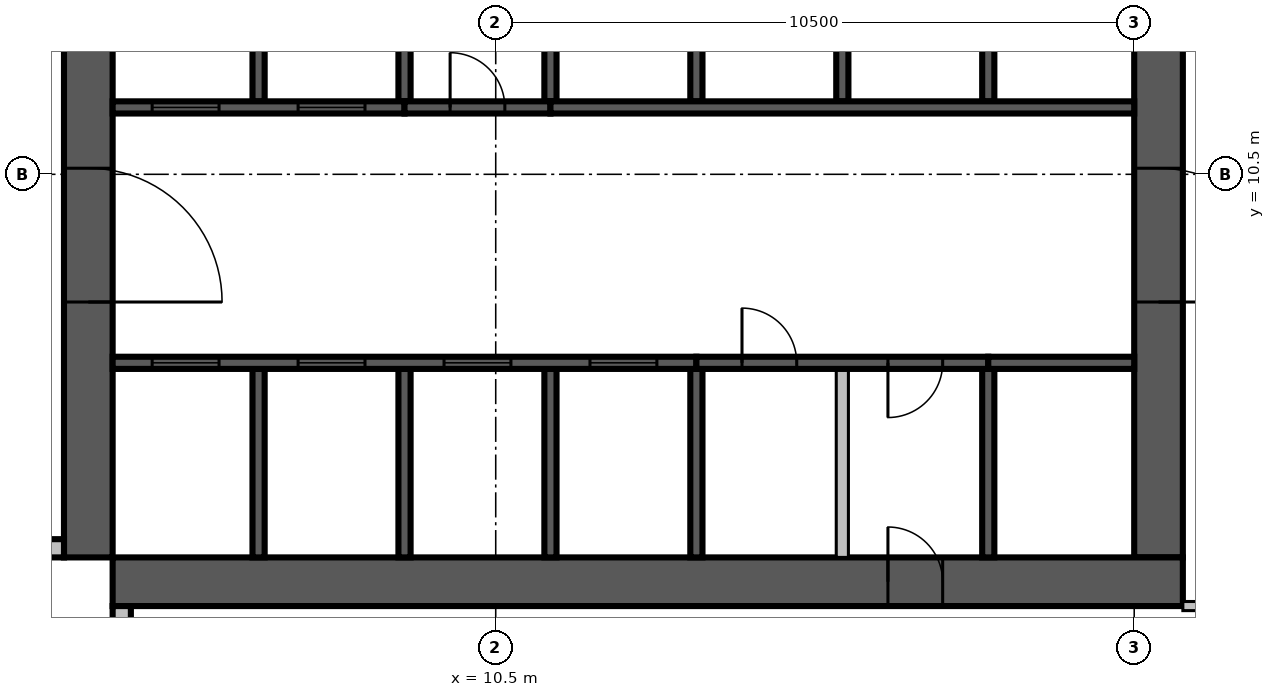
"""IFC4 building model, lengths in metres.
Left out: names, types, materials, properties, quantities, classifications, styles, units other than length and angle.
Written with IfcOpenShell. Run it as: python <this file> out.ifc"""

import sys

from ifc_helpers import new_model, si_unit, direction, frame, frame_2d, origin, place, context, subcontext, project, spatial, rectangle, extrude, source, transform, mapped, element, fill, save


model = new_model("IFC4")
c1 = context("Model", 3, precision=1e-05, world=origin(), true_north=direction((0.0, 1.0)))
c2 = subcontext(c1, "Body", "Model", "MODEL_VIEW")
j1 = project(units=[si_unit("LENGTHUNIT", "METRE"), si_unit("PLANEANGLEUNIT", "RADIAN")], contexts=[c1])
p1 = place(None, origin())
s1 = spatial("IfcSite", under=j1, at=p1, CompositionType="ELEMENT")
p2 = place(p1, origin())
s2 = spatial("IfcBuilding", under=s1, at=p2, CompositionType="ELEMENT")
p3 = place(p2, frame((0.0, 0.0, 196.8)))
s3 = spatial("IfcBuildingStorey", under=s2, at=p3, CompositionType="ELEMENT", Elevation=196.8)
m1 = source(origin(), c2, "Body", "SweptSolid", [
    extrude(rectangle(XDim=17.6, YDim=0.8, at=frame_2d((8.8, 0.0))), origin(), (0.0, 0.0, 1.0), 3.8),
])
p4 = place(p3, frame((3.8, 4.2, 0.0), z_axis=(0.0, 0.0, 1.0), x_axis=(0.0, 1.0, 0.0)))
e1 = element("IfcWall", 1, at=p4, inside=s3, PredefinedType="SHEAR", context=c2, shape_type="MappedRepresentation", body=[
    mapped(m1, transform((0.0, 0.0, 0.0), scale=1.0)),
])
m2 = source(origin(), c2, "Body", "SweptSolid", [
    extrude(rectangle(XDim=2.2, YDim=2.1, at=frame_2d((1.1, 1.05))), frame((0.0, 0.41, 0.0), z_axis=(0.0, -1.0, 0.0), x_axis=(1.0, 0.0, 0.0)), (0.0, 0.0, 1.0), 0.82),
])
p5 = place(p4, frame((4.2, 0.0, 0.0)))
e2 = element("IfcOpeningElement", 2, at=p5, cuts=e1, PredefinedType="OPENING", context=c2, shape_type="MappedRepresentation", body=[
    mapped(m2, transform((0.0, 0.0, 0.0), scale=1.0)),
])
m3 = source(origin(), c2, "Body", "SweptSolid", [
    extrude(rectangle(XDim=0.9, YDim=2.1, at=frame_2d((0.45, 1.05))), frame((0.0, 0.41, 0.0), z_axis=(0.0, -1.0, 0.0), x_axis=(1.0, 0.0, 0.0)), (0.0, 0.0, 1.0), 0.82),
])
p6 = place(p4, frame((10.95, 0.0, 0.0)))
e3 = element("IfcOpeningElement", 3, at=p6, cuts=e1, PredefinedType="OPENING", context=c2, shape_type="MappedRepresentation", body=[
    mapped(m3, transform((0.0, 0.0, 0.0), scale=1.0)),
])
m4 = source(origin(), c2, "Body", "SweptSolid", [
    extrude(rectangle(XDim=16.8, YDim=0.8, at=frame_2d((8.4, 0.0))), origin(), (0.0, 0.0, 1.0), 3.8),
])
p7 = place(p3, frame((21.4, 4.2, 0.0), z_axis=(0.0, 0.0, 1.0), x_axis=(0.0, 1.0, 0.0)))
e4 = element("IfcWall", 4, at=p7, inside=s3, PredefinedType="SHEAR", context=c2, shape_type="MappedRepresentation", body=[
    mapped(m4, transform((0.0, 0.0, 0.0), scale=1.0)),
])
p8 = place(p7, frame((4.2, 0.0, 0.0)))
e5 = element("IfcOpeningElement", 5, at=p8, cuts=e4, PredefinedType="OPENING", context=c2, shape_type="MappedRepresentation", body=[
    mapped(m2, transform((0.0, 0.0, 0.0), scale=1.0)),
])
m5 = source(origin(), c2, "Body", "SweptSolid", [
    extrude(rectangle(XDim=1.2, YDim=2.1, at=frame_2d((0.6, 1.05))), frame((0.0, 0.41, 0.0), z_axis=(0.0, -1.0, 0.0), x_axis=(1.0, 0.0, 0.0)), (0.0, 0.0, 1.0), 0.82),
])
p9 = place(p7, frame((14.7, 0.0, 0.0)))
e6 = element("IfcOpeningElement", 6, at=p9, cuts=e4, PredefinedType="OPENING", context=c2, shape_type="MappedRepresentation", body=[
    mapped(m5, transform((0.0, 0.0, 0.0), scale=1.0)),
])
p10 = place(p3, frame((4.2, 3.8, 0.0), z_axis=(0.0, 0.0, 1.0), x_axis=(1.0, 0.0, 0.0)))
e7 = element("IfcWall", 7, at=p10, inside=s3, PredefinedType="SHEAR", context=c2, shape_type="MappedRepresentation", body=[
    mapped(m1, transform((0.0, 0.0, 0.0), scale=1.0)),
])
p11 = place(p10, frame((12.75, 0.0, 0.0)))
e8 = element("IfcOpeningElement", 8, at=p11, cuts=e7, PredefinedType="OPENING", context=c2, shape_type="MappedRepresentation", body=[
    mapped(m3, transform((0.0, 0.0, 0.0), scale=1.0)),
])
m6 = source(origin(), c2, "Body", "SweptSolid", [
    extrude(rectangle(XDim=3.4, YDim=0.3, at=frame_2d((1.7, 0.0))), origin(), (0.0, 0.0, 1.0), 3.4),
])
p12 = place(p3, frame((0.0, 4.35, 0.0), z_axis=(0.0, 0.0, 1.0), x_axis=(1.0, 0.0, 0.0)))
e9 = element("IfcWall", 9, at=p12, inside=s3, PredefinedType="STANDARD", context=c2, shape_type="MappedRepresentation", body=[
    mapped(m6, transform((0.0, 0.0, 0.0), scale=1.0)),
])
m7 = source(origin(), c2, "Body", "SweptSolid", [
    extrude(rectangle(XDim=1.8, YDim=2.3, at=frame_2d((0.9, 1.15))), frame((0.0, 0.16, 0.0), z_axis=(0.0, -1.0, 0.0), x_axis=(1.0, 0.0, 0.0)), (0.0, 0.0, 1.0), 0.32),
])
p13 = place(p12, frame((1.2, 0.0, 0.6)))
e10 = element("IfcOpeningElement", 10, at=p13, cuts=e9, PredefinedType="OPENING", context=c2, shape_type="MappedRepresentation", body=[
    mapped(m7, transform((0.0, 0.0, 0.0), scale=1.0)),
])
p14 = place(p3, frame((4.35, 3.4, 0.0), z_axis=(0.0, 0.0, 1.0), x_axis=(0.0, -1.0, 0.0)))
e11 = element("IfcWall", 11, at=p14, inside=s3, PredefinedType="STANDARD", context=c2, shape_type="MappedRepresentation", body=[
    mapped(m6, transform((0.0, 0.0, 0.0), scale=1.0)),
])
p15 = place(p14, frame((0.4, 0.0, 0.6)))
e12 = element("IfcOpeningElement", 12, at=p15, cuts=e11, PredefinedType="OPENING", context=c2, shape_type="MappedRepresentation", body=[
    mapped(m7, transform((0.0, 0.0, 0.0), scale=1.0)),
])
m8 = source(origin(), c2, "Body", "SweptSolid", [
    extrude(rectangle(XDim=3.1, YDim=0.2, at=frame_2d((1.55, 0.0))), origin(), (0.0, 0.0, 1.0), 3.8),
])
for number, where, z_axis, x_axis in (
    (13, (6.6, 4.2, 0.0), (0.0, 0.0, 1.0), (0.0, 1.0, 0.0)),
    (14, (9.0, 4.2, 0.0), (0.0, 0.0, 1.0), (0.0, 1.0, 0.0)),
    (15, (11.4, 4.2, 0.0), (0.0, 0.0, 1.0), (0.0, 1.0, 0.0)),
):
    element("IfcWall", number, at=place(p3, frame(where, z_axis=z_axis, x_axis=x_axis)), inside=s3, PredefinedType="SOLIDWALL", context=c2, shape_type="MappedRepresentation", body=[
        mapped(m8, transform((0.0, 0.0, 0.0), scale=1.0)),
    ])
m9 = source(origin(), c2, "Body", "SweptSolid", [
    extrude(rectangle(XDim=3.1, YDim=0.2, at=frame_2d((1.55, 0.0))), origin(), (0.0, 0.0, 1.0), 3.4),
])
for number, where, z_axis, x_axis in (
    (16, (13.8, 4.2, 0.0), (0.0, 0.0, 1.0), (0.0, 1.0, 0.0)),
    (17, (18.6, 4.2, 0.0), (0.0, 0.0, 1.0), (0.0, 1.0, 0.0)),
):
    element("IfcWall", number, at=place(p3, frame(where, z_axis=z_axis, x_axis=x_axis)), inside=s3, PredefinedType="SOLIDWALL", context=c2, shape_type="MappedRepresentation", body=[
        mapped(m9, transform((0.0, 0.0, 0.0), scale=1.0)),
    ])
m10 = source(origin(), c2, "Body", "SweptSolid", [
    extrude(rectangle(XDim=3.1, YDim=0.2, at=frame_2d((1.55, 0.0))), origin(), (0.0, 0.0, 1.0), 3.4),
])
p16 = place(p3, frame((16.2, 4.2, 0.0), z_axis=(0.0, 0.0, 1.0), x_axis=(0.0, 1.0, 0.0)))
e18 = element("IfcWall", 18, at=p16, inside=s3, PredefinedType="PARTITIONING", context=c2, shape_type="MappedRepresentation", body=[
    mapped(m10, transform((0.0, 0.0, 0.0), scale=1.0)),
])
m11 = source(origin(), c2, "Body", "SweptSolid", [
    extrude(rectangle(XDim=3.0, YDim=0.2, at=frame_2d((1.5, 0.0))), origin(), (0.0, 0.0, 1.0), 3.8),
])
p17 = place(p3, frame((6.6, 11.7, 0.0), z_axis=(0.0, 0.0, 1.0), x_axis=(0.0, 1.0, 0.0)))
e19 = element("IfcWall", 19, at=p17, inside=s3, PredefinedType="SOLIDWALL", context=c2, shape_type="MappedRepresentation", body=[
    mapped(m11, transform((0.0, 0.0, 0.0), scale=1.0)),
])
m12 = source(origin(), c2, "Body", "SweptSolid", [
    extrude(rectangle(XDim=3.0, YDim=0.2, at=frame_2d((1.5, 0.0))), origin(), (0.0, 0.0, 1.0), 3.4),
])
for number, where, z_axis, x_axis in (
    (20, (9.0, 11.7, 0.0), (0.0, 0.0, 1.0), (0.0, 1.0, 0.0)),
    (21, (11.4, 11.7, 0.0), (0.0, 0.0, 1.0), (0.0, 1.0, 0.0)),
):
    element("IfcWall", number, at=place(p3, frame(where, z_axis=z_axis, x_axis=x_axis)), inside=s3, PredefinedType="SOLIDWALL", context=c2, shape_type="MappedRepresentation", body=[
        mapped(m12, transform((0.0, 0.0, 0.0), scale=1.0)),
    ])
for number, where, z_axis, x_axis in (
    (22, (13.8, 11.7, 0.0), (0.0, 0.0, 1.0), (0.0, 1.0, 0.0)),
    (23, (16.2, 11.7, 0.0), (0.0, 0.0, 1.0), (0.0, 1.0, 0.0)),
    (24, (18.6, 11.7, 0.0), (0.0, 0.0, 1.0), (0.0, 1.0, 0.0)),
):
    element("IfcWall", number, at=place(p3, frame(where, z_axis=z_axis, x_axis=x_axis)), inside=s3, PredefinedType="SOLIDWALL", context=c2, shape_type="MappedRepresentation", body=[
        mapped(m11, transform((0.0, 0.0, 0.0), scale=1.0)),
    ])
m13 = source(origin(), c2, "Body", "SweptSolid", [
    extrude(rectangle(XDim=9.6, YDim=0.2, at=frame_2d((4.8, 0.0))), origin(), (0.0, 0.0, 1.0), 3.8),
])
p18 = place(p3, frame((4.2, 7.4, 0.0), z_axis=(0.0, 0.0, 1.0), x_axis=(1.0, 0.0, 0.0)))
e25 = element("IfcWall", 25, at=p18, inside=s3, PredefinedType="SOLIDWALL", context=c2, shape_type="MappedRepresentation", body=[
    mapped(m13, transform((0.0, 0.0, 0.0), scale=1.0)),
])
m14 = source(origin(), c2, "Body", "SweptSolid", [
    extrude(rectangle(XDim=1.1, YDim=2.1, at=frame_2d((0.55, 1.05))), frame((0.0, 0.11, 0.0), z_axis=(0.0, -1.0, 0.0), x_axis=(1.0, 0.0, 0.0)), (0.0, 0.0, 1.0), 0.22),
])
p19 = place(p18, frame((0.65, 0.0, 0.0)))
e26 = element("IfcOpeningElement", 26, at=p19, cuts=e25, PredefinedType="OPENING", context=c2, shape_type="MappedRepresentation", body=[
    mapped(m14, transform((0.0, 0.0, 0.0), scale=1.0)),
])
p20 = place(p18, frame((3.05, 0.0, 0.0)))
e27 = element("IfcOpeningElement", 27, at=p20, cuts=e25, PredefinedType="OPENING", context=c2, shape_type="MappedRepresentation", body=[
    mapped(m14, transform((0.0, 0.0, 0.0), scale=1.0)),
])
p21 = place(p18, frame((5.45, 0.0, 0.0)))
e28 = element("IfcOpeningElement", 28, at=p21, cuts=e25, PredefinedType="OPENING", context=c2, shape_type="MappedRepresentation", body=[
    mapped(m14, transform((0.0, 0.0, 0.0), scale=1.0)),
])
p22 = place(p18, frame((7.85, 0.0, 0.0)))
e29 = element("IfcOpeningElement", 29, at=p22, cuts=e25, PredefinedType="OPENING", context=c2, shape_type="MappedRepresentation", body=[
    mapped(m14, transform((0.0, 0.0, 0.0), scale=1.0)),
])
m15 = source(origin(), c2, "Body", "SweptSolid", [
    extrude(rectangle(XDim=4.8, YDim=0.2, at=frame_2d((2.4, 0.0))), origin(), (0.0, 0.0, 1.0), 3.4),
])
p23 = place(p3, frame((13.8, 7.4, 0.0), z_axis=(0.0, 0.0, 1.0), x_axis=(1.0, 0.0, 0.0)))
e30 = element("IfcWall", 30, at=p23, inside=s3, PredefinedType="SOLIDWALL", context=c2, shape_type="MappedRepresentation", body=[
    mapped(m15, transform((0.0, 0.0, 0.0), scale=1.0)),
])
m16 = source(origin(), c2, "Body", "SweptSolid", [
    extrude(rectangle(XDim=0.9, YDim=2.1, at=frame_2d((0.45, 1.05))), frame((0.0, 0.11, 0.0), z_axis=(0.0, -1.0, 0.0), x_axis=(1.0, 0.0, 0.0)), (0.0, 0.0, 1.0), 0.22),
])
p24 = place(p23, frame((0.75, 0.0, 0.0)))
e31 = element("IfcOpeningElement", 31, at=p24, cuts=e30, PredefinedType="OPENING", context=c2, shape_type="MappedRepresentation", body=[
    mapped(m16, transform((0.0, 0.0, 0.0), scale=1.0)),
])
p25 = place(p23, frame((3.15, 0.0, 0.0)))
e32 = element("IfcOpeningElement", 32, at=p25, cuts=e30, PredefinedType="OPENING", context=c2, shape_type="MappedRepresentation", body=[
    mapped(m16, transform((0.0, 0.0, 0.0), scale=1.0)),
])
m17 = source(origin(), c2, "Body", "SweptSolid", [
    extrude(rectangle(XDim=2.4, YDim=0.2, at=frame_2d((1.2, 0.0))), origin(), (0.0, 0.0, 1.0), 3.8),
])
p26 = place(p3, frame((18.6, 7.4, 0.0), z_axis=(0.0, 0.0, 1.0), x_axis=(1.0, 0.0, 0.0)))
e33 = element("IfcWall", 33, at=p26, inside=s3, PredefinedType="SOLIDWALL", context=c2, shape_type="MappedRepresentation", body=[
    mapped(m17, transform((0.0, 0.0, 0.0), scale=1.0)),
])
m18 = source(origin(), c2, "Body", "SweptSolid", [
    extrude(rectangle(XDim=4.8, YDim=0.2, at=frame_2d((2.4, 0.0))), origin(), (0.0, 0.0, 1.0), 3.8),
])
p27 = place(p3, frame((4.2, 11.6, 0.0), z_axis=(0.0, 0.0, 1.0), x_axis=(1.0, 0.0, 0.0)))
e34 = element("IfcWall", 34, at=p27, inside=s3, PredefinedType="SOLIDWALL", context=c2, shape_type="MappedRepresentation", body=[
    mapped(m18, transform((0.0, 0.0, 0.0), scale=1.0)),
])
p28 = place(p27, frame((0.65, 0.0, 0.0)))
e35 = element("IfcOpeningElement", 35, at=p28, cuts=e34, PredefinedType="OPENING", context=c2, shape_type="MappedRepresentation", body=[
    mapped(m14, transform((0.0, 0.0, 0.0), scale=1.0)),
])
p29 = place(p27, frame((3.05, 0.0, 0.0)))
e36 = element("IfcOpeningElement", 36, at=p29, cuts=e34, PredefinedType="OPENING", context=c2, shape_type="MappedRepresentation", body=[
    mapped(m14, transform((0.0, 0.0, 0.0), scale=1.0)),
])
m19 = source(origin(), c2, "Body", "SweptSolid", [
    extrude(rectangle(XDim=2.4, YDim=0.2, at=frame_2d((1.2, 0.0))), origin(), (0.0, 0.0, 1.0), 3.4),
])
p30 = place(p3, frame((9.0, 11.6, 0.0), z_axis=(0.0, 0.0, 1.0), x_axis=(1.0, 0.0, 0.0)))
e37 = element("IfcWall", 37, at=p30, inside=s3, PredefinedType="SOLIDWALL", context=c2, shape_type="MappedRepresentation", body=[
    mapped(m19, transform((0.0, 0.0, 0.0), scale=1.0)),
])
p31 = place(p30, frame((0.75, 0.0, 0.0)))
e38 = element("IfcOpeningElement", 38, at=p31, cuts=e37, PredefinedType="OPENING", context=c2, shape_type="MappedRepresentation", body=[
    mapped(m16, transform((0.0, 0.0, 0.0), scale=1.0)),
])
p32 = place(p3, frame((11.4, 11.6, 0.0), z_axis=(0.0, 0.0, 1.0), x_axis=(1.0, 0.0, 0.0)))
e39 = element("IfcWall", 39, at=p32, inside=s3, PredefinedType="SOLIDWALL", context=c2, shape_type="MappedRepresentation", body=[
    mapped(m13, transform((0.0, 0.0, 0.0), scale=1.0)),
])
m20 = source(origin(), c2, "Body", "SweptSolid", [
    extrude(rectangle(XDim=7.525, YDim=0.15, at=frame_2d((3.763, 0.0))), origin(), (0.0, 0.0, 1.0), 3.4),
])
p33 = place(p3, frame((21.8, 3.4, 0.0), z_axis=(0.0, 0.0, 1.0), x_axis=(1.0, 0.0, 0.0)))
e40 = element("IfcWall", 40, at=p33, inside=s3, PredefinedType="PARTITIONING", context=c2, shape_type="MappedRepresentation", body=[
    mapped(m20, transform((0.0, 0.0, 0.0), scale=1.0)),
])
m21 = source(origin(), c2, "Body", "SweptSolid", [
    extrude(rectangle(XDim=1.0, YDim=2.1, at=frame_2d((0.5, 1.05))), frame((0.0, 0.085, 0.0), z_axis=(0.0, -1.0, 0.0), x_axis=(1.0, 0.0, 0.0)), (0.0, 0.0, 1.0), 0.17),
])
p34 = place(p33, frame((3.3, 0.0, 0.0)))
e41 = element("IfcOpeningElement", 41, at=p34, cuts=e40, PredefinedType="OPENING", context=c2, shape_type="MappedRepresentation", body=[
    mapped(m21, transform((0.0, 0.0, 0.0), scale=1.0)),
])
m22 = source(origin(), c2, "Body", "SweptSolid", [
    extrude(rectangle(XDim=0.9, YDim=2.1, at=frame_2d((0.45, 1.05))), frame((0.0, 0.085, 0.0), z_axis=(0.0, -1.0, 0.0), x_axis=(1.0, 0.0, 0.0)), (0.0, 0.0, 1.0), 0.17),
])
p35 = place(p33, frame((2.312, 0.0, 0.0)))
e42 = element("IfcOpeningElement", 42, at=p35, cuts=e40, PredefinedType="OPENING", context=c2, shape_type="MappedRepresentation", body=[
    mapped(m22, transform((0.0, 0.0, 0.0), scale=1.0)),
])
m23 = source(origin(), c2, "Body", "SweptSolid", [
    extrude(rectangle(XDim=1.1, YDim=2.1, at=frame_2d((0.55, 1.05))), frame((0.0, 0.025, 0.0), z_axis=(0.0, -1.0, 0.0), x_axis=(1.0, 0.0, 0.0)), (0.0, 0.0, 1.0), 0.05),
])
p36 = place(p19, origin())
e43 = element("IfcDoor", 43, at=p36, inside=s3, OperationType="SLIDING_TO_LEFT", PredefinedType="DOOR", context=c2, shape_type="MappedRepresentation", body=[
    mapped(m23, transform((0.0, 0.0, 0.0), scale=1.0)),
])
fill(e26, e43)
p37 = place(p20, origin())
e44 = element("IfcDoor", 44, at=p37, inside=s3, OperationType="SLIDING_TO_LEFT", PredefinedType="DOOR", context=c2, shape_type="MappedRepresentation", body=[
    mapped(m23, transform((0.0, 0.0, 0.0), scale=1.0)),
])
fill(e27, e44)
p38 = place(p21, origin())
e45 = element("IfcDoor", 45, at=p38, inside=s3, OperationType="SLIDING_TO_LEFT", PredefinedType="DOOR", context=c2, shape_type="MappedRepresentation", body=[
    mapped(m23, transform((0.0, 0.0, 0.0), scale=1.0)),
])
fill(e28, e45)
p39 = place(p22, origin())
e46 = element("IfcDoor", 46, at=p39, inside=s3, OperationType="SLIDING_TO_LEFT", PredefinedType="DOOR", context=c2, shape_type="MappedRepresentation", body=[
    mapped(m23, transform((0.0, 0.0, 0.0), scale=1.0)),
])
fill(e29, e46)
m24 = source(origin(), c2, "Body", "SweptSolid", [
    extrude(rectangle(XDim=0.9, YDim=2.1, at=frame_2d((0.45, 1.05))), frame((0.0, 0.025, 0.0), z_axis=(0.0, -1.0, 0.0), x_axis=(1.0, 0.0, 0.0)), (0.0, 0.0, 1.0), 0.05),
])
p40 = place(p24, origin())
e47 = element("IfcDoor", 47, at=p40, inside=s3, OperationType="SINGLE_SWING_LEFT", PredefinedType="DOOR", context=c2, shape_type="MappedRepresentation", body=[
    mapped(m24, transform((0.0, 0.0, 0.0), scale=1.0)),
])
fill(e31, e47)
p41 = place(p25, origin())
e48 = element("IfcDoor", 48, at=p41, inside=s3, OperationType="SINGLE_SWING_RIGHT", PredefinedType="DOOR", context=c2, shape_type="MappedRepresentation", body=[
    mapped(m24, transform((0.0, 0.0, 0.0), scale=1.0)),
])
fill(e32, e48)
p42 = place(p28, origin())
e49 = element("IfcDoor", 49, at=p42, inside=s3, OperationType="SLIDING_TO_LEFT", PredefinedType="DOOR", context=c2, shape_type="MappedRepresentation", body=[
    mapped(m23, transform((0.0, 0.0, 0.0), scale=1.0)),
])
fill(e35, e49)
p43 = place(p29, origin())
e50 = element("IfcDoor", 50, at=p43, inside=s3, OperationType="SLIDING_TO_LEFT", PredefinedType="DOOR", context=c2, shape_type="MappedRepresentation", body=[
    mapped(m23, transform((0.0, 0.0, 0.0), scale=1.0)),
])
fill(e36, e50)
p44 = place(p31, origin())
e51 = element("IfcDoor", 51, at=p44, inside=s3, OperationType="SINGLE_SWING_LEFT", PredefinedType="DOOR", context=c2, shape_type="MappedRepresentation", body=[
    mapped(m24, transform((0.0, 0.0, 0.0), scale=1.0)),
])
fill(e38, e51)
m25 = source(origin(), c2, "Body", "SweptSolid", [
    extrude(rectangle(XDim=2.2, YDim=2.1, at=frame_2d((1.1, 1.05))), frame((0.0, 0.025, 0.0), z_axis=(0.0, -1.0, 0.0), x_axis=(1.0, 0.0, 0.0)), (0.0, 0.0, 1.0), 0.05),
])
p45 = place(p8, origin())
e52 = element("IfcDoor", 52, at=p45, inside=s3, OperationType="DOUBLE_DOOR_SINGLE_SWING", PredefinedType="DOOR", context=c2, shape_type="MappedRepresentation", body=[
    mapped(m25, transform((0.0, 0.0, 0.0), scale=1.0)),
])
fill(e5, e52)
p46 = place(p5, origin())
e53 = element("IfcDoor", 53, at=p46, inside=s3, OperationType="DOUBLE_DOOR_SINGLE_SWING", PredefinedType="DOOR", context=c2, shape_type="MappedRepresentation", body=[
    mapped(m25, transform((0.0, 0.0, 0.0), scale=1.0)),
])
fill(e2, e53)
p47 = place(p11, origin())
e54 = element("IfcDoor", 54, at=p47, inside=s3, OperationType="SINGLE_SWING_LEFT", PredefinedType="DOOR", context=c2, shape_type="MappedRepresentation", body=[
    mapped(m24, transform((0.0, 0.0, 0.0), scale=1.0)),
])
fill(e8, e54)
save(model, sys.argv[1])
